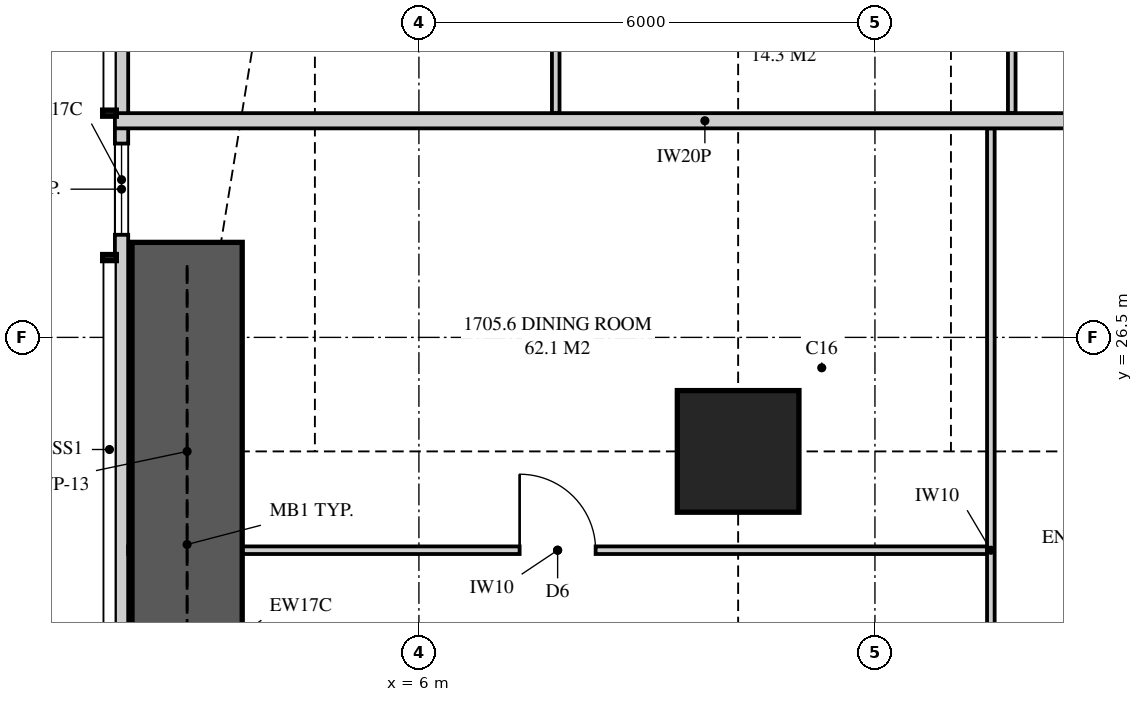
"""IFC4 building model, lengths in metres.
Left out: names, types, materials, properties, quantities, classifications, styles, units other than length and angle.
Written with IfcOpenShell. Run it as: python <this file> out.ifc"""

import sys

from ifc_helpers import new_model, si_unit, direction, frame, frame_2d, origin, origin_2d, place, context, subcontext, project, spatial, polyline, rectangle, outline, extrude, element, fill, save


model = new_model("IFC4")
c1 = context("Model", 3, precision=1e-05, world=origin(), true_north=direction((0.0, 1.0)))
c2 = subcontext(c1, "Body", "Model", "MODEL_VIEW")
j1 = project(units=[si_unit("LENGTHUNIT", "METRE"), si_unit("PLANEANGLEUNIT", "RADIAN")], contexts=[c1])
p1 = place(None, origin())
s1 = spatial("IfcSite", under=j1, at=p1, CompositionType="ELEMENT")
p2 = place(p1, origin())
s2 = spatial("IfcBuilding", under=s1, at=p2, CompositionType="ELEMENT")
p3 = place(p2, frame((0.0, 0.0, 64.55)))
s3 = spatial("IfcBuildingStorey", under=s2, at=p3, CompositionType="ELEMENT", Elevation=64.55)
p4 = place(p3, frame((10.2, 25.0, 0.0), z_axis=(0.0, 0.0, 1.0), x_axis=(1.0, 0.0, 0.0)))
e1 = element("IfcColumn", 1, at=p4, inside=s3, PredefinedType="COLUMN", context=c2, shape_type="SweptSolid", body=[
    extrude(rectangle(XDim=1.6, YDim=1.6, at=origin_2d()), origin(), (0.0, 0.0, 1.0), 3.35),
])
p5 = place(p3, frame((2.087, 34.949, 0.0), z_axis=(0.0, 0.0, 1.0), x_axis=(0.0, -1.0, 0.0)))
e2 = element("IfcWall", 2, at=p5, inside=s3, PredefinedType="SOLIDWALL", context=c2, shape_type="SweptSolid", body=[
    extrude(outline(polyline([(0.0, 0.0), (12.749, 0.0), (12.749, 2.15), (9.949, 2.15), (9.949, 3.11), (9.823, 3.11), (9.823, 2.15), (9.73, 2.15), (9.73, 3.11), (0.0, 3.11), (0.0, 0.0)])), frame((0.0, 0.087, 0.0), z_axis=(0.0, -1.0, 0.0), x_axis=(1.0, 0.0, 0.0)), (0.0, 0.0, 1.0), 0.175),
])
p6 = place(p5, frame((2.722, 0.0, 0.4)))
e3 = element("IfcOpeningElement", 3, at=p6, cuts=e2, PredefinedType="OPENING", context=c2, shape_type="SweptSolid", body=[
    extrude(rectangle(XDim=1.8, YDim=1.7, at=frame_2d((0.9, 0.85))), frame((0.0, 0.097, 0.0), z_axis=(0.0, -1.0, 0.0), x_axis=(1.0, 0.0, 0.0)), (0.0, 0.0, 1.0), 0.195),
])
p7 = place(p5, frame((5.899, 0.0, 0.4)))
e4 = element("IfcOpeningElement", 4, at=p7, cuts=e2, PredefinedType="OPENING", context=c2, shape_type="SweptSolid", body=[
    extrude(rectangle(XDim=1.2, YDim=1.7, at=frame_2d((0.6, 0.85))), frame((0.0, 0.097, 0.0), z_axis=(0.0, -1.0, 0.0), x_axis=(1.0, 0.0, 0.0)), (0.0, 0.0, 1.0), 0.195),
])
p8 = place(p3, frame((7.8, 37.825, 0.0), z_axis=(0.0, 0.0, 1.0), x_axis=(0.0, -1.0, 0.0)))
e5 = element("IfcWall", 5, at=p8, inside=s3, PredefinedType="PARTITIONING", context=c2, shape_type="SweptSolid", body=[
    extrude(outline(polyline([(0.0, 0.0), (8.375, 0.0), (8.375, 3.11), (2.697, 3.11), (2.697, 2.15), (0.943, 2.15), (0.943, 3.11), (0.0, 3.11), (0.0, 0.0)])), frame((0.0, 0.05, 0.0), z_axis=(0.0, -1.0, 0.0), x_axis=(1.0, 0.0, 0.0)), (0.0, 0.0, 1.0), 0.1),
])
p9 = place(p8, frame((2.772, 0.0, 0.0)))
e6 = element("IfcOpeningElement", 6, at=p9, cuts=e5, PredefinedType="OPENING", context=c2, shape_type="SweptSolid", body=[
    extrude(rectangle(XDim=0.9, YDim=2.1, at=frame_2d((0.45, 1.05))), frame((0.0, 0.06, 0.0), z_axis=(0.0, -1.0, 0.0), x_axis=(1.0, 0.0, 0.0)), (0.0, 0.0, 1.0), 0.12),
])
p10 = place(p8, frame((6.023, 0.0, 0.0)))
e7 = element("IfcOpeningElement", 7, at=p10, cuts=e5, PredefinedType="OPENING", context=c2, shape_type="SweptSolid", body=[
    extrude(rectangle(XDim=0.9, YDim=2.1, at=frame_2d((0.45, 1.05))), frame((0.0, 0.06, 0.0), z_axis=(0.0, -1.0, 0.0), x_axis=(1.0, 0.0, 0.0)), (0.0, 0.0, 1.0), 0.12),
])
p11 = place(p3, frame((13.8, 37.825, 0.0), z_axis=(0.0, 0.0, 1.0), x_axis=(0.0, -1.0, 0.0)))
e8 = element("IfcWall", 8, at=p11, inside=s3, PredefinedType="PARTITIONING", context=c2, shape_type="SweptSolid", body=[
    extrude(outline(polyline([(1.635, 2.15), (0.0, 2.15), (0.0, 0.0), (8.375, 0.0), (8.375, 3.11), (1.635, 3.11), (1.635, 2.15)]), holes=[polyline([(1.021, 0.133), (0.529, 0.133), (0.529, 0.923), (1.021, 0.923), (1.021, 0.133)]), polyline([(1.021, 1.227), (0.529, 1.227), (0.529, 2.017), (1.021, 2.017), (1.021, 1.227)])]), frame((0.0, 0.05, 0.0), z_axis=(0.0, -1.0, 0.0), x_axis=(1.0, 0.0, 0.0)), (0.0, 0.0, 1.0), 0.1),
])
p12 = place(p11, frame((4.525, 0.0, 0.0)))
e9 = element("IfcOpeningElement", 9, at=p12, cuts=e8, PredefinedType="OPENING", context=c2, shape_type="SweptSolid", body=[
    extrude(rectangle(XDim=0.9, YDim=2.1, at=frame_2d((0.45, 1.05))), frame((0.0, 0.06, 0.0), z_axis=(0.0, -1.0, 0.0), x_axis=(1.0, 0.0, 0.0)), (0.0, 0.0, 1.0), 0.12),
])
p13 = place(p3, frame((2.0, 29.35, 0.0), z_axis=(0.0, 0.0, 1.0), x_axis=(1.0, 0.0, 0.0)))
e10 = element("IfcWall", 10, at=p13, inside=s3, PredefinedType="PARTITIONING", context=c2, shape_type="SweptSolid", body=[
    extrude(outline(polyline([(0.0, 0.0), (15.525, 0.0), (15.525, 3.11), (11.337, 3.11), (11.337, 2.541), (10.663, 2.541), (10.663, 3.11), (9.51, 3.11), (9.51, 2.51), (6.89, 2.51), (6.89, 3.11), (2.969, 3.11), (2.969, 2.541), (2.577, 2.541), (2.577, 2.15), (0.733, 2.15), (0.733, 3.11), (0.0, 3.11), (0.0, 0.0)])), frame((0.0, 0.1, 0.0), z_axis=(0.0, -1.0, 0.0), x_axis=(1.0, 0.0, 0.0)), (0.0, 0.0, 1.0), 0.2),
])
p14 = place(p3, frame((13.525, 18.15, 0.0), z_axis=(0.0, 0.0, 1.0), x_axis=(0.0, 1.0, 0.0)))
e11 = element("IfcWall", 11, at=p14, inside=s3, PredefinedType="PARTITIONING", context=c2, shape_type="SweptSolid", body=[
    extrude(outline(polyline([(0.0, 0.0), (11.1, 0.0), (11.1, 3.11), (7.137, 3.11), (7.137, 2.541), (6.563, 2.541), (6.563, 3.11), (0.0, 3.11), (0.0, 0.0)])), frame((0.0, 0.05, 0.0), z_axis=(0.0, -1.0, 0.0), x_axis=(1.0, 0.0, 0.0)), (0.0, 0.0, 1.0), 0.1),
])
p15 = place(p14, frame((3.025, 0.0, 0.0)))
e12 = element("IfcOpeningElement", 12, at=p15, cuts=e11, PredefinedType="OPENING", context=c2, shape_type="SweptSolid", body=[
    extrude(rectangle(XDim=1.0, YDim=2.1, at=frame_2d((0.5, 1.05))), frame((0.0, 0.06, 0.0), z_axis=(0.0, -1.0, 0.0), x_axis=(1.0, 0.0, 0.0)), (0.0, 0.0, 1.0), 0.12),
])
p16 = place(p3, frame((2.175, 23.7, 0.0), z_axis=(0.0, 0.0, 1.0), x_axis=(1.0, 0.0, 0.0)))
e13 = element("IfcWall", 13, at=p16, inside=s3, PredefinedType="PARTITIONING", context=c2, shape_type="SweptSolid", body=[
    extrude(outline(polyline([(0.529, 2.15), (0.0, 2.15), (0.0, 0.0), (0.529, 0.0), (0.529, 0.581), (1.021, 0.581), (1.021, 0.0), (11.3, 0.0), (11.3, 3.11), (9.285, 3.11), (9.285, 2.51), (6.765, 2.51), (6.765, 3.11), (1.635, 3.11), (1.635, 2.15), (1.021, 2.15), (1.021, 1.569), (0.529, 1.569), (0.529, 2.15)])), frame((0.0, 0.05, 0.0), z_axis=(0.0, -1.0, 0.0), x_axis=(1.0, 0.0, 0.0)), (0.0, 0.0, 1.0), 0.1),
])
p17 = place(p16, frame((5.15, 0.0, 0.0)))
e14 = element("IfcOpeningElement", 14, at=p17, cuts=e13, PredefinedType="OPENING", context=c2, shape_type="SweptSolid", body=[
    extrude(rectangle(XDim=1.0, YDim=2.1, at=frame_2d((0.5, 1.05))), frame((0.0, 0.06, 0.0), z_axis=(0.0, -1.0, 0.0), x_axis=(1.0, 0.0, 0.0)), (0.0, 0.0, 1.0), 0.12),
])
p18 = place(p3, frame((2.95, 22.25, 0.0), z_axis=(0.0, 0.0, 1.0), x_axis=(0.0, 1.0, 0.0)))
e15 = element("IfcWall", 15, at=p18, inside=s3, PredefinedType="SHEAR", context=c2, shape_type="SweptSolid", body=[
    extrude(rectangle(XDim=5.5, YDim=1.45, at=frame_2d((2.75, 0.0))), origin(), (0.0, 0.0, 1.0), 3.35),
])
p19 = place(p7, origin())
e16 = element("IfcWindow", 16, at=p19, inside=s3, PartitioningType="SINGLE_PANEL", PredefinedType="WINDOW", context=c2, shape_type="SweptSolid", body=[
    extrude(rectangle(XDim=1.2, YDim=1.7, at=frame_2d((0.6, 0.85))), frame((0.0, 0.03, 0.0), z_axis=(0.0, -1.0, 0.0), x_axis=(1.0, 0.0, 0.0)), (0.0, 0.0, 1.0), 0.06),
])
fill(e4, e16)
p20 = place(p17, origin())
e17 = element("IfcDoor", 17, at=p20, inside=s3, OperationType="SINGLE_SWING_LEFT", PredefinedType="DOOR", context=c2, shape_type="SweptSolid", body=[
    extrude(rectangle(XDim=1.0, YDim=2.1, at=frame_2d((0.5, 1.05))), frame((0.0, 0.025, 0.0), z_axis=(0.0, -1.0, 0.0), x_axis=(1.0, 0.0, 0.0)), (0.0, 0.0, 1.0), 0.05),
])
fill(e14, e17)
save(model, sys.argv[1])
